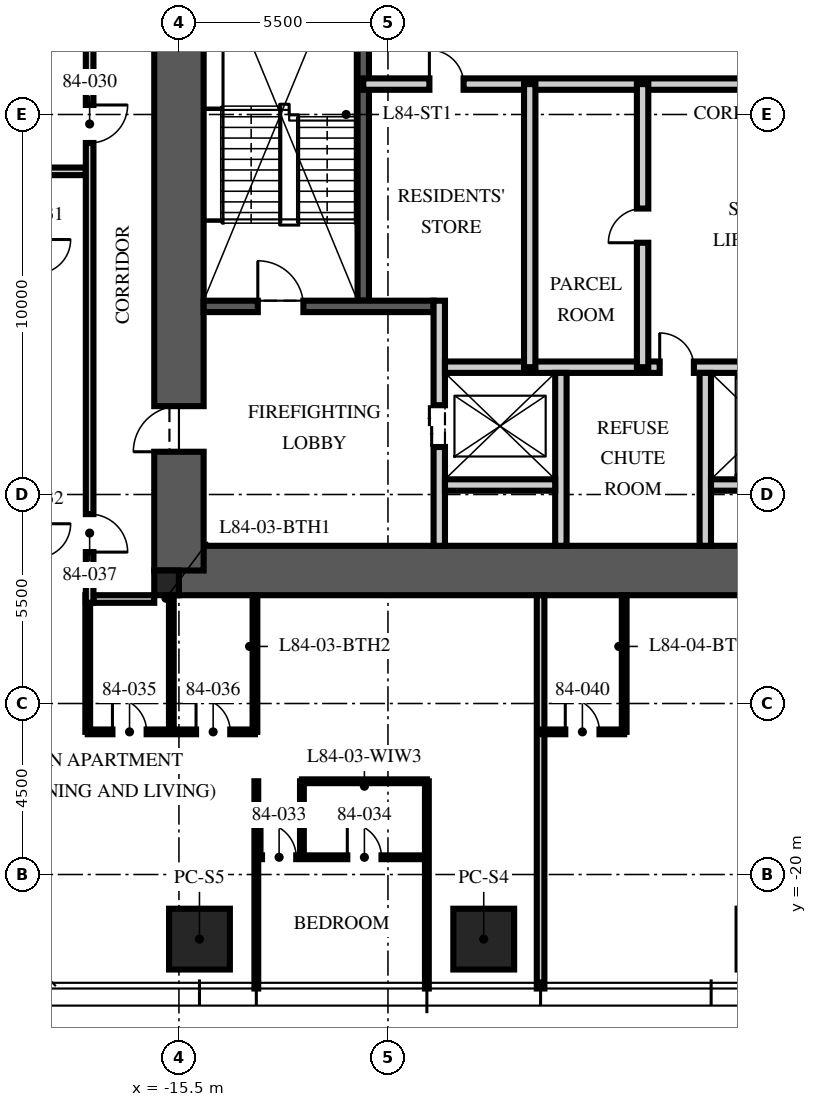
"""IFC4 building model, lengths in metres.
Left out: names, types, materials, properties, quantities, classifications, styles, units other than length and angle.
Written with IfcOpenShell. Run it as: python <this file> out.ifc"""

import sys

from ifc_helpers import new_model, si_unit, direction, frame, frame_2d, origin, origin_2d, place, context, subcontext, project, spatial, rectangle, extrude, element, fill, save


model = new_model("IFC4")
c1 = context("Model", 3, precision=1e-05, world=origin(), true_north=direction((0.0, 1.0)))
c2 = subcontext(c1, "Body", "Model", "MODEL_VIEW")
j1 = project(units=[si_unit("LENGTHUNIT", "METRE"), si_unit("PLANEANGLEUNIT", "RADIAN")], contexts=[c1])
p1 = place(None, origin())
s1 = spatial("IfcSite", under=j1, at=p1, CompositionType="ELEMENT")
p2 = place(p1, origin())
s2 = spatial("IfcBuilding", under=s1, at=p2, CompositionType="ELEMENT")
p3 = place(p2, frame((0.0, 0.0, 334.5)))
s3 = spatial("IfcBuildingStorey", under=s2, at=p3, CompositionType="ELEMENT", Elevation=334.5)
p4 = place(p3, frame((-15.5, -12.0, -0.25), z_axis=(0.0, 0.0, 1.0), x_axis=(1.0, 0.0, 0.0)))
e1 = element("IfcWall", 1, at=p4, inside=s3, PredefinedType="SHEAR", context=c2, shape_type="SweptSolid", body=[
    extrude(rectangle(XDim=31.0, YDim=1.3, at=frame_2d((15.5, 0.0))), origin(), (0.0, 0.0, 1.0), 3.75),
])
p5 = place(p3, frame((-15.5, -12.0, -0.25), z_axis=(0.0, 0.0, 1.0), x_axis=(0.0, 1.0, 0.0)))
e2 = element("IfcWall", 2, at=p5, inside=s3, PredefinedType="SHEAR", context=c2, shape_type="SweptSolid", body=[
    extrude(rectangle(XDim=24.0, YDim=1.3, at=frame_2d((12.0, 0.0))), origin(), (0.0, 0.0, 1.0), 3.75),
])
p6 = place(p5, frame((3.125, 0.0, 0.25)))
e3 = element("IfcOpeningElement", 3, at=p6, cuts=e2, PredefinedType="OPENING", context=c2, shape_type="SweptSolid", body=[
    extrude(rectangle(XDim=1.2, YDim=2.1, at=frame_2d((0.6, 1.05))), frame((0.0, 0.66, 0.0), z_axis=(0.0, -1.0, 0.0), x_axis=(1.0, 0.0, 0.0)), (0.0, 0.0, 1.0), 1.32),
])
p7 = place(p5, frame((19.375, 0.0, 0.25)))
e4 = element("IfcOpeningElement", 4, at=p7, cuts=e2, PredefinedType="OPENING", context=c2, shape_type="SweptSolid", body=[
    extrude(rectangle(XDim=1.8, YDim=2.1, at=frame_2d((0.9, 1.05))), frame((0.0, 0.66, 0.0), z_axis=(0.0, -1.0, 0.0), x_axis=(1.0, 0.0, 0.0)), (0.0, 0.0, 1.0), 1.32),
])
p8 = place(p3, frame((-15.825, -12.325, -0.25), z_axis=(0.0, 0.0, 1.0), x_axis=(1.0, 0.0, 0.0)))
e5 = element("IfcColumn", 5, at=p8, inside=s3, PredefinedType="COLUMN", context=c2, shape_type="SweptSolid", body=[
    extrude(rectangle(XDim=0.65, YDim=0.65, at=origin_2d()), origin(), (0.0, 0.0, 1.0), 3.75),
])
for number, where, z_axis, x_axis in (
    (6, (-7.48, -21.7, 0.0), (0.0, 0.0, 1.0), (1.0, 0.0, 0.0)),
    (7, (-14.96, -21.7, 0.0), (0.0, 0.0, 1.0), (1.0, 0.0, 0.0)),
):
    element("IfcColumn", number, at=place(p3, frame(where, z_axis=z_axis, x_axis=x_axis)), inside=s3, PredefinedType="COLUMN", context=c2, shape_type="SweptSolid", body=[
        extrude(rectangle(XDim=1.6, YDim=1.6, at=origin_2d()), origin(), (0.0, 0.0, 1.0), 3.75),
    ])
p9 = place(p3, frame((-10.65, -4.9, 0.0), z_axis=(0.0, 0.0, 1.0), x_axis=(0.0, 1.0, 0.0)))
e8 = element("IfcWall", 8, at=p9, inside=s3, PredefinedType="SOLIDWALL", context=c2, shape_type="SweptSolid", body=[
    extrude(rectangle(XDim=10.1, YDim=0.3, at=frame_2d((5.05, 0.0))), origin(), (0.0, 0.0, 1.0), 3.5),
])
p10 = place(p3, frame((-14.85, -5.05, 0.0), z_axis=(0.0, 0.0, 1.0), x_axis=(1.0, 0.0, 0.0)))
e9 = element("IfcWall", 9, at=p10, inside=s3, PredefinedType="SOLIDWALL", context=c2, shape_type="SweptSolid", body=[
    extrude(rectangle(XDim=6.05, YDim=0.3, at=frame_2d((3.025, 0.0))), origin(), (0.0, 0.0, 1.0), 3.5),
])
p11 = place(p10, frame((1.425, 0.0, 0.0)))
e10 = element("IfcOpeningElement", 10, at=p11, cuts=e9, PredefinedType="OPENING", context=c2, shape_type="SweptSolid", body=[
    extrude(rectangle(XDim=1.2, YDim=2.1, at=frame_2d((0.6, 1.05))), frame((0.0, 0.16, 0.0), z_axis=(0.0, -1.0, 0.0), x_axis=(1.0, 0.0, 0.0)), (0.0, 0.0, 1.0), 0.32),
])
p12 = place(p3, frame((-8.65, -11.35, 0.0), z_axis=(0.0, 0.0, 1.0), x_axis=(0.0, 1.0, 0.0)))
e11 = element("IfcWall", 11, at=p12, inside=s3, PredefinedType="PARTITIONING", context=c2, shape_type="SweptSolid", body=[
    extrude(rectangle(XDim=6.45, YDim=0.3, at=frame_2d((3.225, 0.0))), origin(), (0.0, 0.0, 1.0), 3.5),
])
p13 = place(p12, frame((2.6, 0.0, 0.0)))
e12 = element("IfcOpeningElement", 12, at=p13, cuts=e11, PredefinedType="OPENING", context=c2, shape_type="SweptSolid", body=[
    extrude(rectangle(XDim=1.1, YDim=2.1, at=frame_2d((0.55, 1.05))), frame((0.0, 0.16, 0.0), z_axis=(0.0, -1.0, 0.0), x_axis=(1.0, 0.0, 0.0)), (0.0, 0.0, 1.0), 0.32),
])
p14 = place(p3, frame((-8.5, -6.65, 0.0), z_axis=(0.0, 0.0, 1.0), x_axis=(1.0, 0.0, 0.0)))
e13 = element("IfcWall", 13, at=p14, inside=s3, PredefinedType="PARTITIONING", context=c2, shape_type="SweptSolid", body=[
    extrude(rectangle(XDim=17.0, YDim=0.3, at=frame_2d((8.5, 0.0))), origin(), (0.0, 0.0, 1.0), 3.5),
])
p15 = place(p14, frame((7.8, 0.0, 0.0)))
e14 = element("IfcOpeningElement", 14, at=p15, cuts=e13, PredefinedType="OPENING", context=c2, shape_type="SweptSolid", body=[
    extrude(rectangle(XDim=1.3, YDim=2.4, at=frame_2d((0.65, 1.2))), frame((0.0, 0.16, 0.0), z_axis=(0.0, -1.0, 0.0), x_axis=(1.0, 0.0, 0.0)), (0.0, 0.0, 1.0), 0.32),
])
p16 = place(p14, frame((5.65, 0.0, 0.0)))
e15 = element("IfcOpeningElement", 15, at=p16, cuts=e13, PredefinedType="OPENING", context=c2, shape_type="SweptSolid", body=[
    extrude(rectangle(XDim=0.9, YDim=2.1, at=frame_2d((0.45, 1.05))), frame((0.0, 0.16, 0.0), z_axis=(0.0, -1.0, 0.0), x_axis=(1.0, 0.0, 0.0)), (0.0, 0.0, 1.0), 0.32),
])
p17 = place(p14, frame((10.4, 0.0, 0.0)))
e16 = element("IfcOpeningElement", 16, at=p17, cuts=e13, PredefinedType="OPENING", context=c2, shape_type="SweptSolid", body=[
    extrude(rectangle(XDim=0.9, YDim=2.1, at=frame_2d((0.45, 1.05))), frame((0.0, 0.16, 0.0), z_axis=(0.0, -1.0, 0.0), x_axis=(1.0, 0.0, 0.0)), (0.0, 0.0, 1.0), 0.32),
])
for number, where, z_axis, x_axis in (
    (17, (-5.45, -11.35, 0.0), (0.0, 0.0, 1.0), (0.0, 1.0, 0.0)),
    (18, (-1.65, -11.35, 0.0), (0.0, 0.0, 1.0), (0.0, 1.0, 0.0)),
):
    element("IfcWall", number, at=place(p3, frame(where, z_axis=z_axis, x_axis=x_axis)), inside=s3, PredefinedType="PARTITIONING", context=c2, shape_type="SweptSolid", body=[
        extrude(rectangle(XDim=4.55, YDim=0.3, at=frame_2d((2.275, 0.0))), origin(), (0.0, 0.0, 1.0), 3.5),
    ])
for number, where, z_axis, x_axis in (
    (19, (-8.5, -9.75, 0.0), (0.0, 0.0, 1.0), (1.0, 0.0, 0.0)),
    (20, (-1.5, -9.75, 0.0), (0.0, 0.0, 1.0), (1.0, 0.0, 0.0)),
):
    element("IfcWall", number, at=place(p3, frame(where, z_axis=z_axis, x_axis=x_axis)), inside=s3, PredefinedType="PARTITIONING", context=c2, shape_type="SweptSolid", body=[
        extrude(rectangle(XDim=2.9, YDim=0.3, at=frame_2d((1.45, 0.0))), origin(), (0.0, 0.0, 1.0), 3.5),
    ])
p18 = place(p3, frame((-10.65, 0.8, 0.0), z_axis=(0.0, 0.0, 1.0), x_axis=(1.0, 0.0, 0.0)))
e21 = element("IfcWall", 21, at=p18, inside=s3, PredefinedType="PARTITIONING", context=c2, shape_type="SweptSolid", body=[
    extrude(rectangle(XDim=21.3, YDim=0.3, at=frame_2d((10.65, 0.0))), origin(), (0.0, 0.0, 1.0), 3.5),
])
p19 = place(p18, frame((10.05, 0.0, 0.0)))
e22 = element("IfcOpeningElement", 22, at=p19, cuts=e21, PredefinedType="OPENING", context=c2, shape_type="SweptSolid", body=[
    extrude(rectangle(XDim=1.2, YDim=2.1, at=frame_2d((0.6, 1.05))), frame((0.0, 0.16, 0.0), z_axis=(0.0, -1.0, 0.0), x_axis=(1.0, 0.0, 0.0)), (0.0, 0.0, 1.0), 0.32),
])
p20 = place(p18, frame((1.74, 0.0, 0.0)))
e23 = element("IfcOpeningElement", 23, at=p20, cuts=e21, PredefinedType="OPENING", context=c2, shape_type="SweptSolid", body=[
    extrude(rectangle(XDim=0.9, YDim=2.1, at=frame_2d((0.45, 1.05))), frame((0.0, 0.16, 0.0), z_axis=(0.0, -1.0, 0.0), x_axis=(1.0, 0.0, 0.0)), (0.0, 0.0, 1.0), 0.32),
])
p21 = place(p3, frame((-3.3, -6.65, 0.0), z_axis=(0.0, 0.0, 1.0), x_axis=(0.0, 1.0, 0.0)))
e24 = element("IfcWall", 24, at=p21, inside=s3, PredefinedType="PARTITIONING", context=c2, shape_type="SweptSolid", body=[
    extrude(rectangle(XDim=7.45, YDim=0.3, at=frame_2d((3.725, 0.0))), origin(), (0.0, 0.0, 1.0), 3.5),
])
p22 = place(p21, frame((3.275, 0.0, 0.0)))
e25 = element("IfcOpeningElement", 25, at=p22, cuts=e24, PredefinedType="OPENING", context=c2, shape_type="SweptSolid", body=[
    extrude(rectangle(XDim=0.9, YDim=2.1, at=frame_2d((0.45, 1.05))), frame((0.0, 0.16, 0.0), z_axis=(0.0, -1.0, 0.0), x_axis=(1.0, 0.0, 0.0)), (0.0, 0.0, 1.0), 0.32),
])
p23 = place(p3, frame((-6.27, -6.65, 0.0), z_axis=(0.0, 0.0, 1.0), x_axis=(0.0, 1.0, 0.0)))
e26 = element("IfcWall", 26, at=p23, inside=s3, PredefinedType="PARTITIONING", context=c2, shape_type="SweptSolid", body=[
    extrude(rectangle(XDim=7.45, YDim=0.3, at=frame_2d((3.725, 0.0))), origin(), (0.0, 0.0, 1.0), 3.5),
])
p24 = place(p3, frame((-16.15, -12.75, 0.0), z_axis=(0.0, 0.0, 1.0), x_axis=(-1.0, 0.0, 0.0)))
e27 = element("IfcWall", 27, at=p24, inside=s3, PredefinedType="PARTITIONING", context=c2, shape_type="SweptSolid", body=[
    extrude(rectangle(XDim=1.6, YDim=0.2, at=frame_2d((0.8, 0.0))), origin(), (0.0, 0.0, 1.0), 2.6),
])
p25 = place(p3, frame((-17.95, -1.496, 0.0), z_axis=(0.0, 0.0, 1.0), x_axis=(-1.0, 0.0, 0.0)))
e28 = element("IfcWall", 28, at=p25, inside=s3, PredefinedType="PARTITIONING", context=c2, shape_type="SweptSolid", body=[
    extrude(rectangle(XDim=5.05, YDim=0.2, at=frame_2d((2.525, 0.0))), origin(), (0.0, 0.0, 1.0), 3.01),
])
for number, where, z_axis, x_axis in (
    (29, (-13.464, -17.546, 0.0), (0.0, 0.0, 1.0), (0.0, -1.0, 0.0)),
    (30, (-8.976, -17.546, 0.0), (0.0, 0.0, 1.0), (0.0, -1.0, 0.0)),
):
    element("IfcWall", number, at=place(p3, frame(where, z_axis=z_axis, x_axis=x_axis)), inside=s3, PredefinedType="PARTITIONING", context=c2, shape_type="SweptSolid", body=[
        extrude(rectangle(XDim=5.454, YDim=0.1, at=frame_2d((2.727, 0.0))), origin(), (0.0, 0.0, 1.0), 3.01),
    ])
p26 = place(p3, frame((-5.984, -12.65, 0.0), z_axis=(0.0, 0.0, 1.0), x_axis=(0.0, -1.0, 0.0)))
e31 = element("IfcWall", 31, at=p26, inside=s3, PredefinedType="PARTITIONING", context=c2, shape_type="SweptSolid", body=[
    extrude(rectangle(XDim=10.35, YDim=0.2, at=frame_2d((5.175, 0.0))), origin(), (0.0, 0.0, 1.0), 3.01),
])
p27 = place(p3, frame((-13.464, -19.546, 0.0), z_axis=(0.0, 0.0, 1.0), x_axis=(1.0, 0.0, 0.0)))
e32 = element("IfcWall", 32, at=p27, inside=s3, PredefinedType="PARTITIONING", context=c2, shape_type="SweptSolid", body=[
    extrude(rectangle(XDim=4.488, YDim=0.1, at=frame_2d((2.244, 0.0))), origin(), (0.0, 0.0, 1.0), 2.91),
])
p28 = place(p27, frame((0.15, 0.0, 0.0)))
e33 = element("IfcOpeningElement", 33, at=p28, cuts=e32, PredefinedType="OPENING", context=c2, shape_type="SweptSolid", body=[
    extrude(rectangle(XDim=0.9, YDim=2.1, at=frame_2d((0.45, 1.05))), frame((0.0, 0.06, 0.0), z_axis=(0.0, -1.0, 0.0), x_axis=(1.0, 0.0, 0.0)), (0.0, 0.0, 1.0), 0.12),
])
p29 = place(p27, frame((2.394, 0.0, 0.0)))
e34 = element("IfcOpeningElement", 34, at=p29, cuts=e32, PredefinedType="OPENING", context=c2, shape_type="SweptSolid", body=[
    extrude(rectangle(XDim=0.9, YDim=2.1, at=frame_2d((0.45, 1.05))), frame((0.0, 0.06, 0.0), z_axis=(0.0, -1.0, 0.0), x_axis=(1.0, 0.0, 0.0)), (0.0, 0.0, 1.0), 0.12),
])
p30 = place(p3, frame((-12.264, -17.546, 0.0), z_axis=(0.0, 0.0, 1.0), x_axis=(0.0, -1.0, 0.0)))
e35 = element("IfcWall", 35, at=p30, inside=s3, PredefinedType="PARTITIONING", context=c2, shape_type="SweptSolid", body=[
    extrude(rectangle(XDim=2.0, YDim=0.1, at=frame_2d((1.0, 0.0))), origin(), (0.0, 0.0, 1.0), 3.5),
])
p31 = place(p3, frame((-12.264, -17.546, 0.0), z_axis=(0.0, 0.0, 1.0), x_axis=(1.0, 0.0, 0.0)))
e36 = element("IfcWall", 36, at=p31, inside=s3, PredefinedType="PARTITIONING", context=c2, shape_type="SweptSolid", body=[
    extrude(rectangle(XDim=3.288, YDim=0.1, at=frame_2d((1.644, 0.0))), origin(), (0.0, 0.0, 1.0), 2.91),
])
p32 = place(p3, frame((-17.9, -16.246, 0.0), z_axis=(0.0, 0.0, 1.0), x_axis=(1.0, 0.0, 0.0)))
e37 = element("IfcWall", 37, at=p32, inside=s3, PredefinedType="PARTITIONING", context=c2, shape_type="SweptSolid", body=[
    extrude(rectangle(XDim=4.4, YDim=0.125, at=frame_2d((2.2, 0.0))), origin(), (0.0, 0.0, 1.0), 2.6),
])
p33 = place(p32, frame((0.65, 0.0, 0.0)))
e38 = element("IfcOpeningElement", 38, at=p33, cuts=e37, PredefinedType="OPENING", context=c2, shape_type="SweptSolid", body=[
    extrude(rectangle(XDim=0.9, YDim=2.1, at=frame_2d((0.45, 1.05))), frame((0.0, 0.073, 0.0), z_axis=(0.0, -1.0, 0.0), x_axis=(1.0, 0.0, 0.0)), (0.0, 0.0, 1.0), 0.145),
])
p34 = place(p32, frame((2.85, 0.0, 0.0)))
e39 = element("IfcOpeningElement", 39, at=p34, cuts=e37, PredefinedType="OPENING", context=c2, shape_type="SweptSolid", body=[
    extrude(rectangle(XDim=0.9, YDim=2.1, at=frame_2d((0.45, 1.05))), frame((0.0, 0.073, 0.0), z_axis=(0.0, -1.0, 0.0), x_axis=(1.0, 0.0, 0.0)), (0.0, 0.0, 1.0), 0.145),
])
for number, where, z_axis, x_axis in (
    (40, (-17.9, -12.65, 0.0), (0.0, 0.0, 1.0), (0.0, -1.0, 0.0)),
    (41, (-15.7, -12.65, 0.0), (0.0, 0.0, 1.0), (0.0, -1.0, 0.0)),
):
    element("IfcWall", number, at=place(p3, frame(where, z_axis=z_axis, x_axis=x_axis)), inside=s3, PredefinedType="PARTITIONING", context=c2, shape_type="SweptSolid", body=[
        extrude(rectangle(XDim=3.596, YDim=0.125, at=frame_2d((1.798, 0.0))), origin(), (0.0, 0.0, 1.0), 2.6),
    ])
p35 = place(p3, frame((-13.5, -12.65, 0.0), z_axis=(0.0, 0.0, 1.0), x_axis=(0.0, -1.0, 0.0)))
e42 = element("IfcWall", 42, at=p35, inside=s3, PredefinedType="PARTITIONING", context=c2, shape_type="SweptSolid", body=[
    extrude(rectangle(XDim=3.596, YDim=0.125, at=frame_2d((1.798, 0.0))), origin(), (0.0, 0.0, 1.0), 3.5),
])
p36 = place(p3, frame((-5.984, -16.246, 0.0), z_axis=(0.0, 0.0, 1.0), x_axis=(1.0, 0.0, 0.0)))
e43 = element("IfcWall", 43, at=p36, inside=s3, PredefinedType="PARTITIONING", context=c2, shape_type="SweptSolid", body=[
    extrude(rectangle(XDim=2.2, YDim=0.125, at=frame_2d((1.1, 0.0))), origin(), (0.0, 0.0, 1.0), 2.91),
])
p37 = place(p36, frame((0.65, 0.0, 0.0)))
e44 = element("IfcOpeningElement", 44, at=p37, cuts=e43, PredefinedType="OPENING", context=c2, shape_type="SweptSolid", body=[
    extrude(rectangle(XDim=0.9, YDim=2.1, at=frame_2d((0.45, 1.05))), frame((0.0, 0.073, 0.0), z_axis=(0.0, -1.0, 0.0), x_axis=(1.0, 0.0, 0.0)), (0.0, 0.0, 1.0), 0.145),
])
p38 = place(p3, frame((-3.784, -12.65, 0.0), z_axis=(0.0, 0.0, 1.0), x_axis=(0.0, -1.0, 0.0)))
e45 = element("IfcWall", 45, at=p38, inside=s3, PredefinedType="PARTITIONING", context=c2, shape_type="SweptSolid", body=[
    extrude(rectangle(XDim=3.596, YDim=0.125, at=frame_2d((1.798, 0.0))), origin(), (0.0, 0.0, 1.0), 2.91),
])
p39 = place(p3, frame((-17.85, 12.85, 0.0), z_axis=(0.0, 0.0, 1.0), x_axis=(0.0, -1.0, 0.0)))
e46 = element("IfcWall", 46, at=p39, inside=s3, PredefinedType="PARTITIONING", context=c2, shape_type="SweptSolid", body=[
    extrude(rectangle(XDim=25.7, YDim=0.2, at=frame_2d((12.85, 0.0))), origin(), (0.0, 0.0, 1.0), 2.9),
])
p40 = place(p39, frame((12.6, 0.0, 0.0)))
e47 = element("IfcOpeningElement", 47, at=p40, cuts=e46, PredefinedType="OPENING", context=c2, shape_type="SweptSolid", body=[
    extrude(rectangle(XDim=1.0, YDim=2.2, at=frame_2d((0.5, 1.1))), frame((0.0, 0.11, 0.0), z_axis=(0.0, -1.0, 0.0), x_axis=(1.0, 0.0, 0.0)), (0.0, 0.0, 1.0), 0.22),
])
p41 = place(p39, frame((23.366, 0.0, 0.0)))
e48 = element("IfcOpeningElement", 48, at=p41, cuts=e46, PredefinedType="OPENING", context=c2, shape_type="SweptSolid", body=[
    extrude(rectangle(XDim=1.0, YDim=2.2, at=frame_2d((0.5, 1.1))), frame((0.0, 0.11, 0.0), z_axis=(0.0, -1.0, 0.0), x_axis=(1.0, 0.0, 0.0)), (0.0, 0.0, 1.0), 0.22),
])
p42 = place(p11, origin())
e49 = element("IfcDoor", 49, at=p42, inside=s3, OperationType="SINGLE_SWING_LEFT", PredefinedType="DOOR", context=c2, shape_type="SweptSolid", body=[
    extrude(rectangle(XDim=1.2, YDim=2.1, at=frame_2d((0.6, 1.05))), frame((0.0, 0.025, 0.0), z_axis=(0.0, -1.0, 0.0), x_axis=(1.0, 0.0, 0.0)), (0.0, 0.0, 1.0), 0.05),
])
fill(e10, e49)
p43 = place(p6, origin())
e50 = element("IfcDoor", 50, at=p43, inside=s3, OperationType="SINGLE_SWING_LEFT", PredefinedType="DOOR", context=c2, shape_type="SweptSolid", body=[
    extrude(rectangle(XDim=1.2, YDim=2.1, at=frame_2d((0.6, 1.05))), frame((0.0, 0.025, 0.0), z_axis=(0.0, -1.0, 0.0), x_axis=(1.0, 0.0, 0.0)), (0.0, 0.0, 1.0), 0.05),
])
fill(e3, e50)
p44 = place(p13, origin())
e51 = element("IfcDoor", 51, at=p44, inside=s3, OperationType="DOUBLE_DOOR_SLIDING", PredefinedType="DOOR", context=c2, shape_type="SweptSolid", body=[
    extrude(rectangle(XDim=1.1, YDim=2.1, at=frame_2d((0.55, 1.05))), frame((0.0, 0.025, 0.0), z_axis=(0.0, -1.0, 0.0), x_axis=(1.0, 0.0, 0.0)), (0.0, 0.0, 1.0), 0.05),
])
fill(e12, e51)
p45 = place(p16, origin())
e52 = element("IfcDoor", 52, at=p45, inside=s3, OperationType="SINGLE_SWING_LEFT", PredefinedType="DOOR", context=c2, shape_type="SweptSolid", body=[
    extrude(rectangle(XDim=0.9, YDim=2.1, at=frame_2d((0.45, 1.05))), frame((0.0, 0.025, 0.0), z_axis=(0.0, -1.0, 0.0), x_axis=(1.0, 0.0, 0.0)), (0.0, 0.0, 1.0), 0.05),
])
fill(e15, e52)
p46 = place(p22, origin())
e53 = element("IfcDoor", 53, at=p46, inside=s3, OperationType="SINGLE_SWING_LEFT", PredefinedType="DOOR", context=c2, shape_type="SweptSolid", body=[
    extrude(rectangle(XDim=0.9, YDim=2.1, at=frame_2d((0.45, 1.05))), frame((0.0, 0.025, 0.0), z_axis=(0.0, -1.0, 0.0), x_axis=(1.0, 0.0, 0.0)), (0.0, 0.0, 1.0), 0.05),
])
fill(e25, e53)
p47 = place(p20, origin())
e54 = element("IfcDoor", 54, at=p47, inside=s3, OperationType="SINGLE_SWING_LEFT", PredefinedType="DOOR", context=c2, shape_type="SweptSolid", body=[
    extrude(rectangle(XDim=0.9, YDim=2.1, at=frame_2d((0.45, 1.05))), frame((0.0, 0.025, 0.0), z_axis=(0.0, -1.0, 0.0), x_axis=(1.0, 0.0, 0.0)), (0.0, 0.0, 1.0), 0.05),
])
fill(e23, e54)
p48 = place(p40, origin())
e55 = element("IfcDoor", 55, at=p48, inside=s3, OperationType="SINGLE_SWING_LEFT", PredefinedType="DOOR", context=c2, shape_type="SweptSolid", body=[
    extrude(rectangle(XDim=1.0, YDim=2.2, at=frame_2d((0.5, 1.1))), frame((0.0, 0.025, 0.0), z_axis=(0.0, -1.0, 0.0), x_axis=(1.0, 0.0, 0.0)), (0.0, 0.0, 1.0), 0.05),
])
fill(e47, e55)
p49 = place(p28, origin())
e56 = element("IfcDoor", 56, at=p49, inside=s3, OperationType="SINGLE_SWING_LEFT", PredefinedType="DOOR", context=c2, shape_type="SweptSolid", body=[
    extrude(rectangle(XDim=0.9, YDim=2.1, at=frame_2d((0.45, 1.05))), frame((0.0, 0.025, 0.0), z_axis=(0.0, -1.0, 0.0), x_axis=(1.0, 0.0, 0.0)), (0.0, 0.0, 1.0), 0.05),
])
fill(e33, e56)
p50 = place(p29, origin())
e57 = element("IfcDoor", 57, at=p50, inside=s3, OperationType="SINGLE_SWING_LEFT", PredefinedType="DOOR", context=c2, shape_type="SweptSolid", body=[
    extrude(rectangle(XDim=0.9, YDim=2.1, at=frame_2d((0.45, 1.05))), frame((0.0, 0.025, 0.0), z_axis=(0.0, -1.0, 0.0), x_axis=(1.0, 0.0, 0.0)), (0.0, 0.0, 1.0), 0.05),
])
fill(e34, e57)
p51 = place(p33, origin())
e58 = element("IfcDoor", 58, at=p51, inside=s3, OperationType="SINGLE_SWING_LEFT", PredefinedType="DOOR", context=c2, shape_type="SweptSolid", body=[
    extrude(rectangle(XDim=0.9, YDim=2.1, at=frame_2d((0.45, 1.05))), frame((0.0, 0.025, 0.0), z_axis=(0.0, -1.0, 0.0), x_axis=(1.0, 0.0, 0.0)), (0.0, 0.0, 1.0), 0.05),
])
fill(e38, e58)
p52 = place(p34, origin())
e59 = element("IfcDoor", 59, at=p52, inside=s3, OperationType="SINGLE_SWING_LEFT", PredefinedType="DOOR", context=c2, shape_type="SweptSolid", body=[
    extrude(rectangle(XDim=0.9, YDim=2.1, at=frame_2d((0.45, 1.05))), frame((0.0, 0.025, 0.0), z_axis=(0.0, -1.0, 0.0), x_axis=(1.0, 0.0, 0.0)), (0.0, 0.0, 1.0), 0.05),
])
fill(e39, e59)
p53 = place(p41, origin())
e60 = element("IfcDoor", 60, at=p53, inside=s3, OperationType="SINGLE_SWING_RIGHT", PredefinedType="DOOR", context=c2, shape_type="SweptSolid", body=[
    extrude(rectangle(XDim=1.0, YDim=2.2, at=frame_2d((0.5, 1.1))), frame((0.0, 0.025, 0.0), z_axis=(0.0, -1.0, 0.0), x_axis=(1.0, 0.0, 0.0)), (0.0, 0.0, 1.0), 0.05),
])
fill(e48, e60)
p54 = place(p37, origin())
e61 = element("IfcDoor", 61, at=p54, inside=s3, OperationType="SINGLE_SWING_LEFT", PredefinedType="DOOR", context=c2, shape_type="SweptSolid", body=[
    extrude(rectangle(XDim=0.9, YDim=2.1, at=frame_2d((0.45, 1.05))), frame((0.0, 0.025, 0.0), z_axis=(0.0, -1.0, 0.0), x_axis=(1.0, 0.0, 0.0)), (0.0, 0.0, 1.0), 0.05),
])
fill(e44, e61)
save(model, sys.argv[1])
